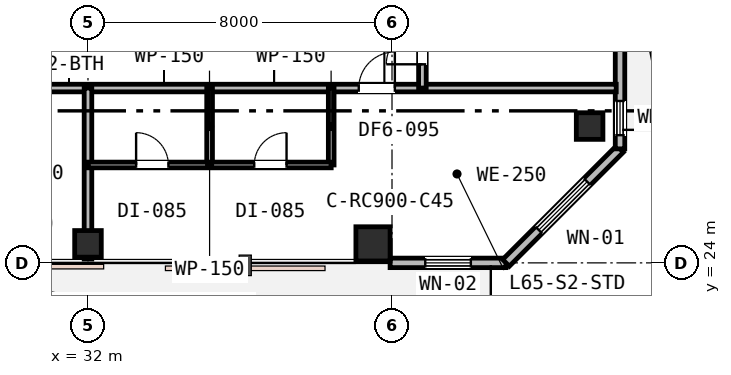
"""IFC4 building model, lengths in metres.
Left out: names, types, materials, properties, quantities, classifications, styles, units other than length and angle.
Written with IfcOpenShell. Run it as: python <this file> out.ifc"""

import sys

from ifc_helpers import new_model, si_unit, direction, frame, frame_2d, origin, origin_2d, place, context, subcontext, project, spatial, rectangle, extrude, element, fill, save


model = new_model("IFC4")
c1 = context("Model", 3, precision=1e-05, world=origin(), true_north=direction((0.0, 1.0)))
c2 = subcontext(c1, "Body", "Model", "MODEL_VIEW")
j1 = project(units=[si_unit("LENGTHUNIT", "METRE"), si_unit("PLANEANGLEUNIT", "RADIAN")], contexts=[c1])
p1 = place(None, origin())
s1 = spatial("IfcSite", under=j1, at=p1, CompositionType="ELEMENT")
p2 = place(p1, origin())
s2 = spatial("IfcBuilding", under=s1, at=p2, CompositionType="ELEMENT")
p3 = place(p2, frame((0.0, 0.0, 252.6)))
s3 = spatial("IfcBuildingStorey", under=s2, at=p3, CompositionType="ELEMENT", Elevation=252.6)
p4 = place(p3, frame((32.0, 24.5, 0.0), z_axis=(0.0, 0.0, 1.0), x_axis=(1.0, 0.0, 0.0)))
e1 = element("IfcColumn", 1, at=p4, inside=s3, PredefinedType="COLUMN", context=c2, shape_type="SweptSolid", body=[
    extrude(rectangle(XDim=0.7, YDim=0.7, at=origin_2d()), origin(), (0.0, 0.0, 1.0), 3.8),
])
p5 = place(p3, frame((39.5, 24.5, 0.0), z_axis=(0.0, 0.0, 1.0), x_axis=(1.0, 0.0, 0.0)))
e2 = element("IfcColumn", 2, at=p5, inside=s3, PredefinedType="COLUMN", context=c2, shape_type="SweptSolid", body=[
    extrude(rectangle(XDim=0.9, YDim=0.9, at=origin_2d()), origin(), (0.0, 0.0, 1.0), 3.8),
])
p6 = place(p3, frame((45.2, 27.6, 0.0), z_axis=(0.0, 0.0, 1.0), x_axis=(1.0, 0.0, 0.0)))
e3 = element("IfcColumn", 3, at=p6, inside=s3, PredefinedType="COLUMN", context=c2, shape_type="SweptSolid", body=[
    extrude(rectangle(XDim=0.7, YDim=0.7, at=origin_2d()), origin(), (0.0, 0.0, 1.0), 3.8),
])
p7 = place(p3, frame((39.95, 24.0, 0.0), z_axis=(0.0, 0.0, 1.0), x_axis=(1.0, 0.0, 0.0)))
e4 = element("IfcWall", 4, at=p7, inside=s3, PredefinedType="STANDARD", context=c2, shape_type="SweptSolid", body=[
    extrude(rectangle(XDim=3.05, YDim=0.25, at=frame_2d((1.525, 0.0))), origin(), (0.0, 0.0, 1.0), 3.53),
])
p8 = place(p7, frame((0.925, 0.0, 0.85)))
e5 = element("IfcOpeningElement", 5, at=p8, cuts=e4, PredefinedType="OPENING", context=c2, shape_type="SweptSolid", body=[
    extrude(rectangle(XDim=1.2, YDim=1.6, at=frame_2d((0.6, 0.8))), frame((0.0, 0.135, 0.0), z_axis=(0.0, -1.0, 0.0), x_axis=(1.0, 0.0, 0.0)), (0.0, 0.0, 1.0), 0.27),
])
p9 = place(p3, frame((43.0, 24.0, 0.0), z_axis=(0.0, 0.0, 1.0), x_axis=(0.707106781187, 0.707106781187, 0.0)))
e6 = element("IfcWall", 6, at=p9, inside=s3, PredefinedType="STANDARD", context=c2, shape_type="SweptSolid", body=[
    extrude(rectangle(XDim=4.243, YDim=0.25, at=frame_2d((2.121, 0.0))), origin(), (0.0, 0.0, 1.0), 3.53),
])
p10 = place(p9, frame((1.221, 0.0, 0.75)))
e7 = element("IfcOpeningElement", 7, at=p10, cuts=e6, PredefinedType="OPENING", context=c2, shape_type="SweptSolid", body=[
    extrude(rectangle(XDim=1.8, YDim=1.85, at=frame_2d((0.9, 0.925))), frame((0.0, 0.135, 0.0), z_axis=(0.0, -1.0, 0.0), x_axis=(1.0, 0.0, 0.0)), (0.0, 0.0, 1.0), 0.27),
])
p11 = place(p3, frame((46.0, 27.0, 0.0), z_axis=(0.0, 0.0, 1.0), x_axis=(0.0, 1.0, 0.0)))
e8 = element("IfcWall", 8, at=p11, inside=s3, PredefinedType="STANDARD", context=c2, shape_type="SweptSolid", body=[
    extrude(rectangle(XDim=2.9, YDim=0.25, at=frame_2d((1.45, 0.0))), origin(), (0.0, 0.0, 1.0), 3.53),
])
p12 = place(p11, frame((0.36, 0.0, 0.9)))
e9 = element("IfcOpeningElement", 9, at=p12, cuts=e8, PredefinedType="OPENING", context=c2, shape_type="SweptSolid", body=[
    extrude(rectangle(XDim=0.9, YDim=1.55, at=frame_2d((0.45, 0.775))), frame((0.0, 0.135, 0.0), z_axis=(0.0, -1.0, 0.0), x_axis=(1.0, 0.0, 0.0)), (0.0, 0.0, 1.0), 0.27),
])
p13 = place(p3, frame((21.6, 28.6, 0.0), z_axis=(0.0, 0.0, 1.0), x_axis=(1.0, 0.0, 0.0)))
e10 = element("IfcWall", 10, at=p13, inside=s3, PredefinedType="PARTITIONING", context=c2, shape_type="SweptSolid", body=[
    extrude(rectangle(XDim=24.3, YDim=0.2, at=frame_2d((12.15, 0.0))), origin(), (0.0, 0.0, 1.0), 3.16),
])
p14 = place(p13, frame((5.925, 0.0, 0.0)))
e11 = element("IfcOpeningElement", 11, at=p14, cuts=e10, PredefinedType="OPENING", context=c2, shape_type="SweptSolid", body=[
    extrude(rectangle(XDim=0.95, YDim=2.15, at=frame_2d((0.475, 1.075))), frame((0.0, 0.11, 0.0), z_axis=(0.0, -1.0, 0.0), x_axis=(1.0, 0.0, 0.0)), (0.0, 0.0, 1.0), 0.22),
])
p15 = place(p13, frame((17.525, 0.0, 0.0)))
e12 = element("IfcOpeningElement", 12, at=p15, cuts=e10, PredefinedType="OPENING", context=c2, shape_type="SweptSolid", body=[
    extrude(rectangle(XDim=0.95, YDim=2.15, at=frame_2d((0.475, 1.075))), frame((0.0, 0.11, 0.0), z_axis=(0.0, -1.0, 0.0), x_axis=(1.0, 0.0, 0.0)), (0.0, 0.0, 1.0), 0.22),
])
p16 = place(p3, frame((40.8, 28.6, 0.0), z_axis=(0.0, 0.0, 1.0), x_axis=(0.0, 1.0, 0.0)))
e13 = element("IfcWall", 13, at=p16, inside=s3, PredefinedType="PARTITIONING", context=c2, shape_type="SweptSolid", body=[
    extrude(rectangle(XDim=14.3, YDim=0.2, at=frame_2d((7.15, 0.0))), origin(), (0.0, 0.0, 1.0), 3.16),
])
p17 = place(p16, frame((0.625, 0.0, 0.0)))
e14 = element("IfcOpeningElement", 14, at=p17, cuts=e13, PredefinedType="OPENING", context=c2, shape_type="SweptSolid", body=[
    extrude(rectangle(XDim=0.95, YDim=2.15, at=frame_2d((0.475, 1.075))), frame((0.0, 0.11, 0.0), z_axis=(0.0, -1.0, 0.0), x_axis=(1.0, 0.0, 0.0)), (0.0, 0.0, 1.0), 0.22),
])
p18 = place(p3, frame((32.0, 24.1, 0.0), z_axis=(0.0, 0.0, 1.0), x_axis=(0.0, 1.0, 0.0)))
e15 = element("IfcWall", 15, at=p18, inside=s3, PredefinedType="PARTITIONING", context=c2, shape_type="SweptSolid", body=[
    extrude(rectangle(XDim=4.5, YDim=0.2, at=frame_2d((2.25, 0.0))), origin(), (0.0, 0.0, 1.0), 3.16),
])
for number, where, z_axis, x_axis in (
    (16, (38.4, 26.576, 0.0), (0.0, 0.0, 1.0), (0.0, 1.0, 0.0)),
    (17, (35.2, 26.576, 0.0), (0.0, 0.0, 1.0), (0.0, 1.0, 0.0)),
):
    element("IfcWall", number, at=place(p3, frame(where, z_axis=z_axis, x_axis=x_axis)), inside=s3, PredefinedType="PARTITIONING", context=c2, shape_type="SweptSolid", body=[
        extrude(rectangle(XDim=2.024, YDim=0.15, at=frame_2d((1.012, 0.0))), origin(), (0.0, 0.0, 1.0), 3.53),
    ])
p19 = place(p3, frame((32.0, 26.576, 0.0), z_axis=(0.0, 0.0, 1.0), x_axis=(1.0, 0.0, 0.0)))
e18 = element("IfcWall", 18, at=p19, inside=s3, PredefinedType="PARTITIONING", context=c2, shape_type="SweptSolid", body=[
    extrude(rectangle(XDim=6.4, YDim=0.15, at=frame_2d((3.2, 0.0))), origin(), (0.0, 0.0, 1.0), 3.16),
])
p20 = place(p19, frame((1.266, 0.0, 0.0)))
e19 = element("IfcOpeningElement", 19, at=p20, cuts=e18, PredefinedType="OPENING", context=c2, shape_type="SweptSolid", body=[
    extrude(rectangle(XDim=0.85, YDim=2.15, at=frame_2d((0.425, 1.075))), frame((0.0, 0.085, 0.0), z_axis=(0.0, -1.0, 0.0), x_axis=(1.0, 0.0, 0.0)), (0.0, 0.0, 1.0), 0.17),
])
p21 = place(p19, frame((4.375, 0.0, 0.0)))
e20 = element("IfcOpeningElement", 20, at=p21, cuts=e18, PredefinedType="OPENING", context=c2, shape_type="SweptSolid", body=[
    extrude(rectangle(XDim=0.85, YDim=2.15, at=frame_2d((0.425, 1.075))), frame((0.0, 0.085, 0.0), z_axis=(0.0, -1.0, 0.0), x_axis=(1.0, 0.0, 0.0)), (0.0, 0.0, 1.0), 0.17),
])
p22 = place(p8, origin())
e21 = element("IfcWindow", 21, at=p22, inside=s3, PartitioningType="SINGLE_PANEL", PredefinedType="WINDOW", context=c2, shape_type="SweptSolid", body=[
    extrude(rectangle(XDim=1.2, YDim=1.6, at=frame_2d((0.6, 0.8))), frame((0.0, 0.03, 0.0), z_axis=(0.0, -1.0, 0.0), x_axis=(1.0, 0.0, 0.0)), (0.0, 0.0, 1.0), 0.06),
])
fill(e5, e21)
p23 = place(p10, origin())
e22 = element("IfcWindow", 22, at=p23, inside=s3, PartitioningType="SINGLE_PANEL", PredefinedType="WINDOW", context=c2, shape_type="SweptSolid", body=[
    extrude(rectangle(XDim=1.8, YDim=1.85, at=frame_2d((0.9, 0.925))), frame((0.0, 0.03, 0.0), z_axis=(0.0, -1.0, 0.0), x_axis=(1.0, 0.0, 0.0)), (0.0, 0.0, 1.0), 0.06),
])
fill(e7, e22)
p24 = place(p12, origin())
e23 = element("IfcWindow", 23, at=p24, inside=s3, PartitioningType="SINGLE_PANEL", PredefinedType="WINDOW", context=c2, shape_type="SweptSolid", body=[
    extrude(rectangle(XDim=0.9, YDim=1.55, at=frame_2d((0.45, 0.775))), frame((0.0, 0.03, 0.0), z_axis=(0.0, -1.0, 0.0), x_axis=(1.0, 0.0, 0.0)), (0.0, 0.0, 1.0), 0.06),
])
fill(e9, e23)
p25 = place(p17, origin())
e24 = element("IfcDoor", 24, at=p25, inside=s3, OperationType="SINGLE_SWING_LEFT", PredefinedType="DOOR", context=c2, shape_type="SweptSolid", body=[
    extrude(rectangle(XDim=0.95, YDim=2.15, at=frame_2d((0.475, 1.075))), frame((0.0, 0.025, 0.0), z_axis=(0.0, -1.0, 0.0), x_axis=(1.0, 0.0, 0.0)), (0.0, 0.0, 1.0), 0.05),
])
fill(e14, e24)
p26 = place(p15, origin())
e25 = element("IfcDoor", 25, at=p26, inside=s3, OperationType="SINGLE_SWING_RIGHT", PredefinedType="DOOR", context=c2, shape_type="SweptSolid", body=[
    extrude(rectangle(XDim=0.95, YDim=2.15, at=frame_2d((0.475, 1.075))), frame((0.0, 0.025, 0.0), z_axis=(0.0, -1.0, 0.0), x_axis=(1.0, 0.0, 0.0)), (0.0, 0.0, 1.0), 0.05),
])
fill(e12, e25)
p27 = place(p20, origin())
e26 = element("IfcDoor", 26, at=p27, inside=s3, OperationType="SINGLE_SWING_LEFT", PredefinedType="DOOR", context=c2, shape_type="SweptSolid", body=[
    extrude(rectangle(XDim=0.85, YDim=2.15, at=frame_2d((0.425, 1.075))), frame((0.0, 0.025, 0.0), z_axis=(0.0, -1.0, 0.0), x_axis=(1.0, 0.0, 0.0)), (0.0, 0.0, 1.0), 0.05),
])
fill(e19, e26)
p28 = place(p21, origin())
e27 = element("IfcDoor", 27, at=p28, inside=s3, OperationType="SINGLE_SWING_RIGHT", PredefinedType="DOOR", context=c2, shape_type="SweptSolid", body=[
    extrude(rectangle(XDim=0.85, YDim=2.15, at=frame_2d((0.425, 1.075))), frame((0.0, 0.025, 0.0), z_axis=(0.0, -1.0, 0.0), x_axis=(1.0, 0.0, 0.0)), (0.0, 0.0, 1.0), 0.05),
])
fill(e20, e27)
save(model, sys.argv[1])
